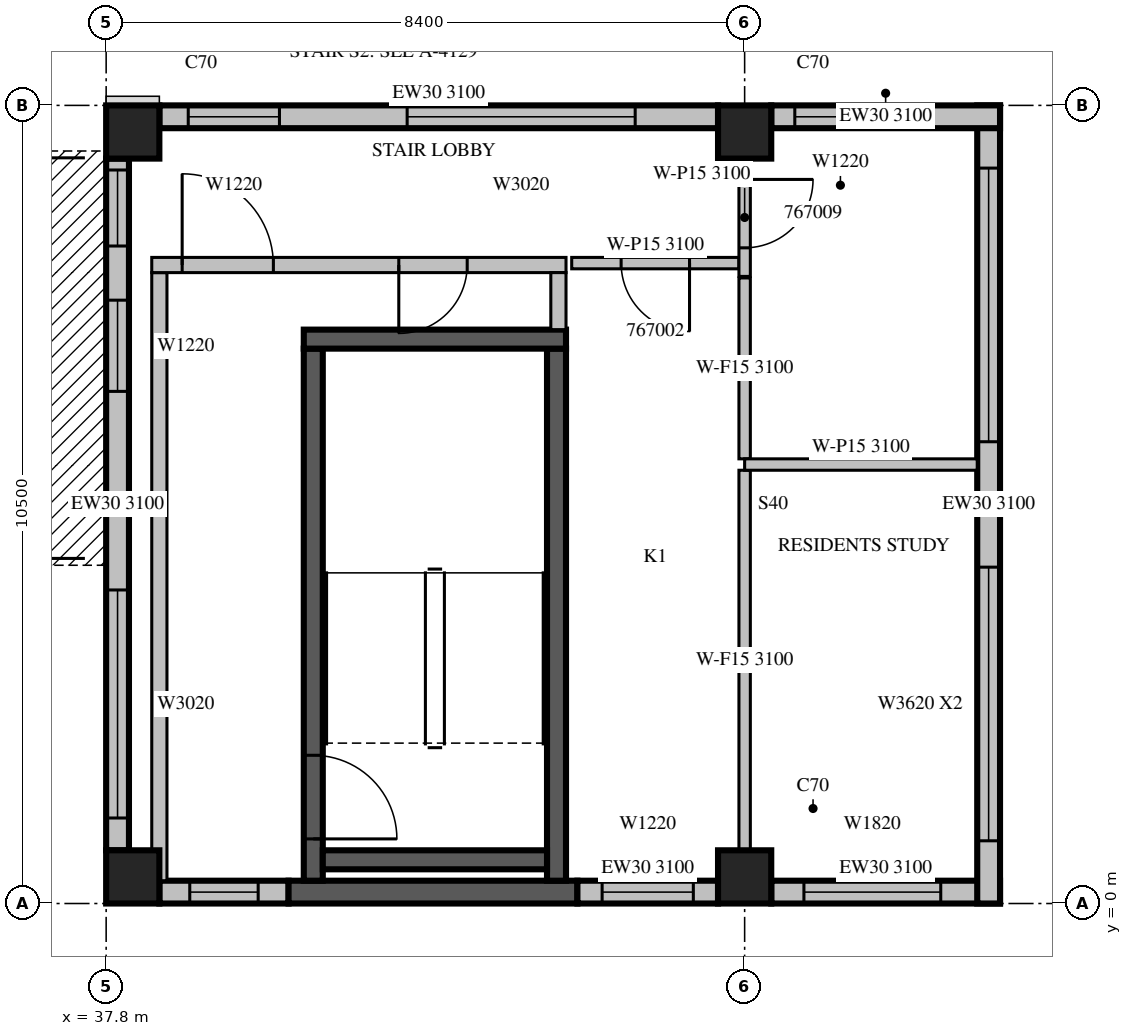
"""IFC4 building model, lengths in metres.
Left out: names, types, materials, properties, quantities, classifications, styles, units other than length and angle.
Written with IfcOpenShell. Run it as: python <this file> out.ifc"""

import sys

from ifc_helpers import new_model, si_unit, direction, frame, frame_2d, origin, origin_2d, place, context, subcontext, project, spatial, rectangle, extrude, source, transform, mapped, element, fill, save


model = new_model("IFC4")
c1 = context("Model", 3, precision=1e-05, world=origin(), true_north=direction((0.0, 1.0)))
c2 = subcontext(c1, "Body", "Model", "MODEL_VIEW")
j1 = project(units=[si_unit("LENGTHUNIT", "METRE"), si_unit("PLANEANGLEUNIT", "RADIAN")], contexts=[c1])
p1 = place(None, origin())
s1 = spatial("IfcSite", under=j1, at=p1, CompositionType="ELEMENT")
p2 = place(p1, origin())
s2 = spatial("IfcBuilding", under=s1, at=p2, CompositionType="ELEMENT")
p3 = place(p2, frame((0.0, 0.0, 295.0)))
s3 = spatial("IfcBuildingStorey", under=s2, at=p3, CompositionType="ELEMENT", Elevation=295.0)
m1 = source(origin(), c2, "Body", "SweptSolid", [
    extrude(rectangle(XDim=0.7, YDim=0.7, at=origin_2d()), origin(), (0.0, 0.0, 1.0), 3.5),
])
for number, where, z_axis, x_axis in (
    (1, (38.15, 0.35, 0.0), (0.0, 0.0, 1.0), (1.0, 0.0, 0.0)),
    (2, (46.2, 0.35, 0.0), (0.0, 0.0, 1.0), (1.0, 0.0, 0.0)),
    (3, (38.15, 10.15, 0.0), (0.0, 0.0, 1.0), (1.0, 0.0, 0.0)),
    (4, (46.2, 10.15, 0.0), (0.0, 0.0, 1.0), (1.0, 0.0, 0.0)),
):
    element("IfcColumn", number, at=place(p3, frame(where, z_axis=z_axis, x_axis=x_axis)), inside=s3, PredefinedType="COLUMN", context=c2, shape_type="MappedRepresentation", body=[
        mapped(m1, transform((0.0, 0.0, 0.0), scale=1.0)),
    ])
m2 = source(origin(), c2, "Body", "SweptSolid", [
    extrude(rectangle(XDim=1.7, YDim=0.3, at=frame_2d((0.85, 0.0))), origin(), (0.0, 0.0, 1.0), 3.1),
])
p4 = place(p3, frame((38.5, 0.15, 0.0), z_axis=(0.0, 0.0, 1.0), x_axis=(1.0, 0.0, 0.0)))
e5 = element("IfcWall", 5, at=p4, inside=s3, PredefinedType="STANDARD", context=c2, shape_type="MappedRepresentation", body=[
    mapped(m2, transform((0.0, 0.0, 0.0), scale=1.0)),
])
m3 = source(origin(), c2, "Body", "SweptSolid", [
    extrude(rectangle(XDim=0.9, YDim=2.0, at=frame_2d((0.45, 1.0))), frame((0.0, 0.16, 0.0), z_axis=(0.0, -1.0, 0.0), x_axis=(1.0, 0.0, 0.0)), (0.0, 0.0, 1.0), 0.32),
])
p5 = place(p4, frame((0.4, 0.0, 0.6)))
e6 = element("IfcOpeningElement", 6, at=p5, cuts=e5, PredefinedType="OPENING", context=c2, shape_type="MappedRepresentation", body=[
    mapped(m3, transform((0.0, 0.0, 0.0), scale=1.0)),
])
m4 = source(origin(), c2, "Body", "SweptSolid", [
    extrude(rectangle(XDim=3.8, YDim=0.3, at=frame_2d((1.9, 0.0))), origin(), (0.0, 0.0, 1.0), 3.1),
])
p6 = place(p3, frame((40.2, 0.15, 0.0), z_axis=(0.0, 0.0, 1.0), x_axis=(1.0, 0.0, 0.0)))
e7 = element("IfcWall", 7, at=p6, inside=s3, PredefinedType="SOLIDWALL", context=c2, shape_type="MappedRepresentation", body=[
    mapped(m4, transform((0.0, 0.0, 0.0), scale=1.0)),
])
m5 = source(origin(), c2, "Body", "SweptSolid", [
    extrude(rectangle(XDim=1.85, YDim=0.3, at=frame_2d((0.925, 0.0))), origin(), (0.0, 0.0, 1.0), 3.1),
])
p7 = place(p3, frame((44.0, 0.15, 0.0), z_axis=(0.0, 0.0, 1.0), x_axis=(1.0, 0.0, 0.0)))
e8 = element("IfcWall", 8, at=p7, inside=s3, PredefinedType="STANDARD", context=c2, shape_type="MappedRepresentation", body=[
    mapped(m5, transform((0.0, 0.0, 0.0), scale=1.0)),
])
m6 = source(origin(), c2, "Body", "SweptSolid", [
    extrude(rectangle(XDim=1.2, YDim=2.0, at=frame_2d((0.6, 1.0))), frame((0.0, 0.16, 0.0), z_axis=(0.0, -1.0, 0.0), x_axis=(1.0, 0.0, 0.0)), (0.0, 0.0, 1.0), 0.32),
])
p8 = place(p7, frame((0.325, 0.0, 0.6)))
e9 = element("IfcOpeningElement", 9, at=p8, cuts=e8, PredefinedType="OPENING", context=c2, shape_type="MappedRepresentation", body=[
    mapped(m6, transform((0.0, 0.0, 0.0), scale=1.0)),
])
m7 = source(origin(), c2, "Body", "SweptSolid", [
    extrude(rectangle(XDim=3.01, YDim=0.3, at=frame_2d((1.505, 0.0))), origin(), (0.0, 0.0, 1.0), 3.1),
])
p9 = place(p3, frame((46.55, 0.15, 0.0), z_axis=(0.0, 0.0, 1.0), x_axis=(1.0, 0.0, 0.0)))
e10 = element("IfcWall", 10, at=p9, inside=s3, PredefinedType="STANDARD", context=c2, shape_type="MappedRepresentation", body=[
    mapped(m7, transform((0.0, 0.0, 0.0), scale=1.0)),
])
m8 = source(origin(), c2, "Body", "SweptSolid", [
    extrude(rectangle(XDim=1.8, YDim=2.0, at=frame_2d((0.9, 1.0))), frame((0.0, 0.16, 0.0), z_axis=(0.0, -1.0, 0.0), x_axis=(1.0, 0.0, 0.0)), (0.0, 0.0, 1.0), 0.32),
])
p10 = place(p9, frame((0.43, 0.0, 0.6)))
e11 = element("IfcOpeningElement", 11, at=p10, cuts=e10, PredefinedType="OPENING", context=c2, shape_type="MappedRepresentation", body=[
    mapped(m8, transform((0.0, 0.0, 0.0), scale=1.0)),
])
m9 = source(origin(), c2, "Body", "SweptSolid", [
    extrude(rectangle(XDim=10.5, YDim=0.3, at=frame_2d((5.25, 0.0))), origin(), (0.0, 0.0, 1.0), 3.1),
])
p11 = place(p3, frame((49.41, 0.0, 0.0), z_axis=(0.0, 0.0, 1.0), x_axis=(0.0, 1.0, 0.0)))
e12 = element("IfcWall", 12, at=p11, inside=s3, PredefinedType="STANDARD", context=c2, shape_type="MappedRepresentation", body=[
    mapped(m9, transform((0.0, 0.0, 0.0), scale=1.0)),
])
m10 = source(origin(), c2, "Body", "SweptSolid", [
    extrude(rectangle(XDim=3.6, YDim=2.0, at=frame_2d((1.8, 1.0))), frame((0.0, 0.16, 0.0), z_axis=(0.0, -1.0, 0.0), x_axis=(1.0, 0.0, 0.0)), (0.0, 0.0, 1.0), 0.32),
])
p12 = place(p11, frame((0.825, 0.0, 0.6)))
e13 = element("IfcOpeningElement", 13, at=p12, cuts=e12, PredefinedType="OPENING", context=c2, shape_type="MappedRepresentation", body=[
    mapped(m10, transform((0.0, 0.0, 0.0), scale=1.0)),
])
p13 = place(p11, frame((6.075, 0.0, 0.6)))
e14 = element("IfcOpeningElement", 14, at=p13, cuts=e12, PredefinedType="OPENING", context=c2, shape_type="MappedRepresentation", body=[
    mapped(m10, transform((0.0, 0.0, 0.0), scale=1.0)),
])
p14 = place(p3, frame((49.56, 10.35, 0.0), z_axis=(0.0, 0.0, 1.0), x_axis=(-1.0, 0.0, 0.0)))
e15 = element("IfcWall", 15, at=p14, inside=s3, PredefinedType="STANDARD", context=c2, shape_type="MappedRepresentation", body=[
    mapped(m7, transform((0.0, 0.0, 0.0), scale=1.0)),
])
p15 = place(p14, frame((1.5, 0.0, 0.6)))
e16 = element("IfcOpeningElement", 16, at=p15, cuts=e15, PredefinedType="OPENING", context=c2, shape_type="MappedRepresentation", body=[
    mapped(m6, transform((0.0, 0.0, 0.0), scale=1.0)),
])
m11 = source(origin(), c2, "Body", "SweptSolid", [
    extrude(rectangle(XDim=7.35, YDim=0.3, at=frame_2d((3.675, 0.0))), origin(), (0.0, 0.0, 1.0), 3.1),
])
p16 = place(p3, frame((45.85, 10.35, 0.0), z_axis=(0.0, 0.0, 1.0), x_axis=(-1.0, 0.0, 0.0)))
e17 = element("IfcWall", 17, at=p16, inside=s3, PredefinedType="STANDARD", context=c2, shape_type="MappedRepresentation", body=[
    mapped(m11, transform((0.0, 0.0, 0.0), scale=1.0)),
])
m12 = source(origin(), c2, "Body", "SweptSolid", [
    extrude(rectangle(XDim=3.0, YDim=2.0, at=frame_2d((1.5, 1.0))), frame((0.0, 0.16, 0.0), z_axis=(0.0, -1.0, 0.0), x_axis=(1.0, 0.0, 0.0)), (0.0, 0.0, 1.0), 0.32),
])
p17 = place(p16, frame((1.09, 0.0, 0.6)))
e18 = element("IfcOpeningElement", 18, at=p17, cuts=e17, PredefinedType="OPENING", context=c2, shape_type="MappedRepresentation", body=[
    mapped(m12, transform((0.0, 0.0, 0.0), scale=1.0)),
])
p18 = place(p16, frame((5.77, 0.0, 0.6)))
e19 = element("IfcOpeningElement", 19, at=p18, cuts=e17, PredefinedType="OPENING", context=c2, shape_type="MappedRepresentation", body=[
    mapped(m6, transform((0.0, 0.0, 0.0), scale=1.0)),
])
p19 = place(p3, frame((37.95, 9.8, 0.0), z_axis=(0.0, 0.0, 1.0), x_axis=(0.0, -1.0, 0.0)))
e20 = element("IfcWall", 20, at=p19, inside=s3, PredefinedType="STANDARD", context=c2, shape_type="SweptSolid", body=[
    extrude(rectangle(XDim=9.1, YDim=0.3, at=frame_2d((4.55, 0.0))), origin(), (0.0, 0.0, 1.0), 3.1),
])
p20 = place(p19, frame((1.863, 0.0, 0.6)))
e21 = element("IfcOpeningElement", 21, at=p20, cuts=e20, PredefinedType="OPENING", context=c2, shape_type="MappedRepresentation", body=[
    mapped(m6, transform((0.0, 0.0, 0.0), scale=1.0)),
])
p21 = place(p19, frame((5.675, 0.0, 0.6)))
e22 = element("IfcOpeningElement", 22, at=p21, cuts=e20, PredefinedType="OPENING", context=c2, shape_type="MappedRepresentation", body=[
    mapped(m12, transform((0.0, 0.0, 0.0), scale=1.0)),
])
p22 = place(p19, frame((0.15, 0.0, 0.0)))
e23 = element("IfcOpeningElement", 23, at=p22, cuts=e20, PredefinedType="OPENING", context=c2, shape_type="SweptSolid", body=[
    extrude(rectangle(XDim=1.0, YDim=2.1, at=frame_2d((0.5, 1.05))), frame((0.0, 0.16, 0.0), z_axis=(0.0, -1.0, 0.0), x_axis=(1.0, 0.0, 0.0)), (0.0, 0.0, 1.0), 0.32),
])
m13 = source(origin(), c2, "Body", "SweptSolid", [
    extrude(rectangle(XDim=7.0, YDim=0.25, at=frame_2d((3.5, 0.0))), origin(), (0.0, 0.0, 1.0), 3.1),
])
p23 = place(p3, frame((40.525, 0.3, 0.0), z_axis=(0.0, 0.0, 1.0), x_axis=(0.0, 1.0, 0.0)))
e24 = element("IfcWall", 24, at=p23, inside=s3, PredefinedType="SOLIDWALL", context=c2, shape_type="MappedRepresentation", body=[
    mapped(m13, transform((0.0, 0.0, 0.0), scale=1.0)),
])
m14 = source(origin(), c2, "Body", "SweptSolid", [
    extrude(rectangle(XDim=1.1, YDim=2.1, at=frame_2d((0.55, 1.05))), frame((0.0, 0.135, 0.0), z_axis=(0.0, -1.0, 0.0), x_axis=(1.0, 0.0, 0.0)), (0.0, 0.0, 1.0), 0.27),
])
p24 = place(p23, frame((0.55, 0.0, 0.0)))
e25 = element("IfcOpeningElement", 25, at=p24, cuts=e24, PredefinedType="OPENING", context=c2, shape_type="MappedRepresentation", body=[
    mapped(m14, transform((0.0, 0.0, 0.0), scale=1.0)),
])
p25 = place(p3, frame((43.725, 0.3, 0.0), z_axis=(0.0, 0.0, 1.0), x_axis=(0.0, 1.0, 0.0)))
e26 = element("IfcWall", 26, at=p25, inside=s3, PredefinedType="SOLIDWALL", context=c2, shape_type="MappedRepresentation", body=[
    mapped(m13, transform((0.0, 0.0, 0.0), scale=1.0)),
])
m15 = source(origin(), c2, "Body", "SweptSolid", [
    extrude(rectangle(XDim=3.45, YDim=0.25, at=frame_2d((1.725, 0.0))), origin(), (0.0, 0.0, 1.0), 3.1),
])
p26 = place(p3, frame((40.4, 7.425, 0.0), z_axis=(0.0, 0.0, 1.0), x_axis=(1.0, 0.0, 0.0)))
e27 = element("IfcWall", 27, at=p26, inside=s3, PredefinedType="SOLIDWALL", context=c2, shape_type="MappedRepresentation", body=[
    mapped(m15, transform((0.0, 0.0, 0.0), scale=1.0)),
])
m16 = source(origin(), c2, "Body", "SweptSolid", [
    extrude(rectangle(XDim=2.95, YDim=0.25, at=frame_2d((1.475, 0.0))), origin(), (0.0, 0.0, 1.0), 3.1),
])
p27 = place(p3, frame((40.65, 0.575, 0.0), z_axis=(0.0, 0.0, 1.0), x_axis=(1.0, 0.0, 0.0)))
e28 = element("IfcWall", 28, at=p27, inside=s3, PredefinedType="SOLIDWALL", context=c2, shape_type="MappedRepresentation", body=[
    mapped(m16, transform((0.0, 0.0, 0.0), scale=1.0)),
])
m17 = source(origin(), c2, "Body", "SweptSolid", [
    extrude(rectangle(XDim=8.0, YDim=0.2, at=frame_2d((4.0, 0.0))), origin(), (0.0, 0.0, 1.0), 3.1),
])
p28 = place(p3, frame((38.5, 0.3, 0.0), z_axis=(0.0, 0.0, 1.0), x_axis=(0.0, 1.0, 0.0)))
e29 = element("IfcWall", 29, at=p28, inside=s3, PredefinedType="PARTITIONING", context=c2, shape_type="MappedRepresentation", body=[
    mapped(m17, transform((0.0, 0.0, 0.0), scale=1.0)),
])
m18 = source(origin(), c2, "Body", "SweptSolid", [
    extrude(rectangle(XDim=5.45, YDim=0.2, at=frame_2d((2.725, 0.0))), origin(), (0.0, 0.0, 1.0), 3.1),
])
p29 = place(p3, frame((38.4, 8.4, 0.0), z_axis=(0.0, 0.0, 1.0), x_axis=(1.0, 0.0, 0.0)))
e30 = element("IfcWall", 30, at=p29, inside=s3, PredefinedType="PARTITIONING", context=c2, shape_type="MappedRepresentation", body=[
    mapped(m18, transform((0.0, 0.0, 0.0), scale=1.0)),
])
m19 = source(origin(), c2, "Body", "SweptSolid", [
    extrude(rectangle(XDim=1.2, YDim=2.1, at=frame_2d((0.6, 1.05))), frame((0.0, 0.11, 0.0), z_axis=(0.0, -1.0, 0.0), x_axis=(1.0, 0.0, 0.0)), (0.0, 0.0, 1.0), 0.22),
])
p30 = place(p29, frame((0.4, 0.0, 0.0)))
e31 = element("IfcOpeningElement", 31, at=p30, cuts=e30, PredefinedType="OPENING", context=c2, shape_type="MappedRepresentation", body=[
    mapped(m19, transform((0.0, 0.0, 0.0), scale=1.0)),
])
m20 = source(origin(), c2, "Body", "SweptSolid", [
    extrude(rectangle(XDim=0.9, YDim=2.1, at=frame_2d((0.45, 1.05))), frame((0.0, 0.11, 0.0), z_axis=(0.0, -1.0, 0.0), x_axis=(1.0, 0.0, 0.0)), (0.0, 0.0, 1.0), 0.22),
])
p31 = place(p29, frame((3.25, 0.0, 0.0)))
e32 = element("IfcOpeningElement", 32, at=p31, cuts=e30, PredefinedType="OPENING", context=c2, shape_type="MappedRepresentation", body=[
    mapped(m20, transform((0.0, 0.0, 0.0), scale=1.0)),
])
m21 = source(origin(), c2, "Body", "SweptSolid", [
    extrude(rectangle(XDim=0.75, YDim=0.2, at=frame_2d((0.375, 0.0))), origin(), (0.0, 0.0, 1.0), 3.1),
])
p32 = place(p3, frame((43.75, 7.55, 0.0), z_axis=(0.0, 0.0, 1.0), x_axis=(0.0, 1.0, 0.0)))
e33 = element("IfcWall", 33, at=p32, inside=s3, PredefinedType="PARTITIONING", context=c2, shape_type="MappedRepresentation", body=[
    mapped(m21, transform((0.0, 0.0, 0.0), scale=1.0)),
])
m22 = source(origin(), c2, "Body", "SweptSolid", [
    extrude(rectangle(XDim=2.2, YDim=0.15, at=frame_2d((1.1, 0.0))), origin(), (0.0, 0.0, 1.0), 3.1),
])
p33 = place(p3, frame((46.125, 8.425, 0.0), z_axis=(0.0, 0.0, 1.0), x_axis=(-1.0, 0.0, 0.0)))
e34 = element("IfcWall", 34, at=p33, inside=s3, PredefinedType="PARTITIONING", context=c2, shape_type="MappedRepresentation", body=[
    mapped(m22, transform((0.0, 0.0, 0.0), scale=1.0)),
])
m23 = source(origin(), c2, "Body", "SweptSolid", [
    extrude(rectangle(XDim=0.9, YDim=2.1, at=frame_2d((0.45, 1.05))), frame((0.0, 0.085, 0.0), z_axis=(0.0, -1.0, 0.0), x_axis=(1.0, 0.0, 0.0)), (0.0, 0.0, 1.0), 0.17),
])
p34 = place(p33, frame((0.65, 0.0, 0.0)))
e35 = element("IfcOpeningElement", 35, at=p34, cuts=e34, PredefinedType="OPENING", context=c2, shape_type="MappedRepresentation", body=[
    mapped(m23, transform((0.0, 0.0, 0.0), scale=1.0)),
])
p35 = place(p3, frame((46.2, 9.801, 0.0), z_axis=(0.0, 0.0, 1.0), x_axis=(0.0, -1.0, 0.0)))
e36 = element("IfcWall", 36, at=p35, inside=s3, PredefinedType="PARTITIONING", context=c2, shape_type="SweptSolid", body=[
    extrude(rectangle(XDim=1.551, YDim=0.15, at=frame_2d((0.775, 0.0))), origin(), (0.0, 0.0, 1.0), 3.1),
])
p36 = place(p35, frame((0.275, 0.0, 0.0)))
e37 = element("IfcOpeningElement", 37, at=p36, cuts=e36, PredefinedType="OPENING", context=c2, shape_type="MappedRepresentation", body=[
    mapped(m23, transform((0.0, 0.0, 0.0), scale=1.0)),
])
p37 = place(p3, frame((46.2, 0.699, 0.0), z_axis=(0.0, 0.0, 1.0), x_axis=(0.0, 1.0, 0.0)))
e38 = element("IfcWall", 38, at=p37, inside=s3, PredefinedType="PARTITIONING", context=c2, shape_type="SweptSolid", body=[
    extrude(rectangle(XDim=5.001, YDim=0.15, at=frame_2d((2.501, 0.0))), origin(), (0.0, 0.0, 1.0), 3.1),
])
p38 = place(p3, frame((46.2, 5.85, 0.0), z_axis=(0.0, 0.0, 1.0), x_axis=(0.0, 1.0, 0.0)))
e39 = element("IfcWall", 39, at=p38, inside=s3, PredefinedType="PARTITIONING", context=c2, shape_type="SweptSolid", body=[
    extrude(rectangle(XDim=2.38, YDim=0.15, at=frame_2d((1.19, 0.0))), origin(), (0.0, 0.0, 1.0), 3.1),
])
m24 = source(origin(), c2, "Body", "SweptSolid", [
    extrude(rectangle(XDim=3.06, YDim=0.15, at=frame_2d((1.53, 0.0))), origin(), (0.0, 0.0, 1.0), 3.1),
])
p39 = place(p3, frame((49.26, 5.775, 0.0), z_axis=(0.0, 0.0, 1.0), x_axis=(-1.0, 0.0, 0.0)))
e40 = element("IfcWall", 40, at=p39, inside=s3, PredefinedType="PARTITIONING", context=c2, shape_type="MappedRepresentation", body=[
    mapped(m24, transform((0.0, 0.0, 0.0), scale=1.0)),
])
m25 = source(origin(), c2, "Body", "SweptSolid", [
    extrude(rectangle(XDim=0.9, YDim=2.0, at=frame_2d((0.45, 1.0))), frame((0.0, 0.03, 0.0), z_axis=(0.0, -1.0, 0.0), x_axis=(1.0, 0.0, 0.0)), (0.0, 0.0, 1.0), 0.06),
])
p40 = place(p5, origin())
e41 = element("IfcWindow", 41, at=p40, inside=s3, PartitioningType="SINGLE_PANEL", PredefinedType="WINDOW", context=c2, shape_type="MappedRepresentation", body=[
    mapped(m25, transform((0.0, 0.0, 0.0), scale=1.0)),
])
fill(e6, e41)
m26 = source(origin(), c2, "Body", "SweptSolid", [
    extrude(rectangle(XDim=1.2, YDim=2.0, at=frame_2d((0.6, 1.0))), frame((0.0, 0.03, 0.0), z_axis=(0.0, -1.0, 0.0), x_axis=(1.0, 0.0, 0.0)), (0.0, 0.0, 1.0), 0.06),
])
p41 = place(p8, origin())
e42 = element("IfcWindow", 42, at=p41, inside=s3, PartitioningType="SINGLE_PANEL", PredefinedType="WINDOW", context=c2, shape_type="MappedRepresentation", body=[
    mapped(m26, transform((0.0, 0.0, 0.0), scale=1.0)),
])
fill(e9, e42)
m27 = source(origin(), c2, "Body", "SweptSolid", [
    extrude(rectangle(XDim=1.8, YDim=2.0, at=frame_2d((0.9, 1.0))), frame((0.0, 0.03, 0.0), z_axis=(0.0, -1.0, 0.0), x_axis=(1.0, 0.0, 0.0)), (0.0, 0.0, 1.0), 0.06),
])
p42 = place(p10, origin())
e43 = element("IfcWindow", 43, at=p42, inside=s3, PartitioningType="SINGLE_PANEL", PredefinedType="WINDOW", context=c2, shape_type="MappedRepresentation", body=[
    mapped(m27, transform((0.0, 0.0, 0.0), scale=1.0)),
])
fill(e11, e43)
m28 = source(origin(), c2, "Body", "SweptSolid", [
    extrude(rectangle(XDim=3.6, YDim=2.0, at=frame_2d((1.8, 1.0))), frame((0.0, 0.03, 0.0), z_axis=(0.0, -1.0, 0.0), x_axis=(1.0, 0.0, 0.0)), (0.0, 0.0, 1.0), 0.06),
])
p43 = place(p12, origin())
e44 = element("IfcWindow", 44, at=p43, inside=s3, PartitioningType="SINGLE_PANEL", PredefinedType="WINDOW", context=c2, shape_type="MappedRepresentation", body=[
    mapped(m28, transform((0.0, 0.0, 0.0), scale=1.0)),
])
fill(e13, e44)
p44 = place(p13, origin())
e45 = element("IfcWindow", 45, at=p44, inside=s3, PartitioningType="SINGLE_PANEL", PredefinedType="WINDOW", context=c2, shape_type="MappedRepresentation", body=[
    mapped(m28, transform((0.0, 0.0, 0.0), scale=1.0)),
])
fill(e14, e45)
p45 = place(p15, origin())
e46 = element("IfcWindow", 46, at=p45, inside=s3, PartitioningType="SINGLE_PANEL", PredefinedType="WINDOW", context=c2, shape_type="MappedRepresentation", body=[
    mapped(m26, transform((0.0, 0.0, 0.0), scale=1.0)),
])
fill(e16, e46)
m29 = source(origin(), c2, "Body", "SweptSolid", [
    extrude(rectangle(XDim=3.0, YDim=2.0, at=frame_2d((1.5, 1.0))), frame((0.0, 0.03, 0.0), z_axis=(0.0, -1.0, 0.0), x_axis=(1.0, 0.0, 0.0)), (0.0, 0.0, 1.0), 0.06),
])
p46 = place(p17, origin())
e47 = element("IfcWindow", 47, at=p46, inside=s3, PartitioningType="SINGLE_PANEL", PredefinedType="WINDOW", context=c2, shape_type="MappedRepresentation", body=[
    mapped(m29, transform((0.0, 0.0, 0.0), scale=1.0)),
])
fill(e18, e47)
p47 = place(p18, origin())
e48 = element("IfcWindow", 48, at=p47, inside=s3, PartitioningType="SINGLE_PANEL", PredefinedType="WINDOW", context=c2, shape_type="MappedRepresentation", body=[
    mapped(m26, transform((0.0, 0.0, 0.0), scale=1.0)),
])
fill(e19, e48)
p48 = place(p20, origin())
e49 = element("IfcWindow", 49, at=p48, inside=s3, PartitioningType="SINGLE_PANEL", PredefinedType="WINDOW", context=c2, shape_type="MappedRepresentation", body=[
    mapped(m26, transform((0.0, 0.0, 0.0), scale=1.0)),
])
fill(e21, e49)
p49 = place(p21, origin())
e50 = element("IfcWindow", 50, at=p49, inside=s3, PartitioningType="SINGLE_PANEL", PredefinedType="WINDOW", context=c2, shape_type="MappedRepresentation", body=[
    mapped(m29, transform((0.0, 0.0, 0.0), scale=1.0)),
])
fill(e22, e50)
p50 = place(p22, origin())
e51 = element("IfcDoor", 51, at=p50, inside=s3, OperationType="SLIDING_TO_LEFT", PredefinedType="DOOR", context=c2, shape_type="SweptSolid", body=[
    extrude(rectangle(XDim=1.0, YDim=2.1, at=frame_2d((0.5, 1.05))), frame((0.0, 0.025, 0.0), z_axis=(0.0, -1.0, 0.0), x_axis=(1.0, 0.0, 0.0)), (0.0, 0.0, 1.0), 0.05),
])
fill(e23, e51)
m30 = source(origin(), c2, "Body", "SweptSolid", [
    extrude(rectangle(XDim=1.1, YDim=2.1, at=frame_2d((0.55, 1.05))), frame((0.0, 0.025, 0.0), z_axis=(0.0, -1.0, 0.0), x_axis=(1.0, 0.0, 0.0)), (0.0, 0.0, 1.0), 0.05),
])
p51 = place(p24, origin())
e52 = element("IfcDoor", 52, at=p51, inside=s3, OperationType="SINGLE_SWING_RIGHT", PredefinedType="DOOR", context=c2, shape_type="MappedRepresentation", body=[
    mapped(m30, transform((0.0, 0.0, 0.0), scale=1.0)),
])
fill(e25, e52)
m31 = source(origin(), c2, "Body", "SweptSolid", [
    extrude(rectangle(XDim=1.2, YDim=2.1, at=frame_2d((0.6, 1.05))), frame((0.0, 0.025, 0.0), z_axis=(0.0, -1.0, 0.0), x_axis=(1.0, 0.0, 0.0)), (0.0, 0.0, 1.0), 0.05),
])
p52 = place(p30, origin())
e53 = element("IfcDoor", 53, at=p52, inside=s3, OperationType="SINGLE_SWING_LEFT", PredefinedType="DOOR", context=c2, shape_type="MappedRepresentation", body=[
    mapped(m31, transform((0.0, 0.0, 0.0), scale=1.0)),
])
fill(e31, e53)
m32 = source(origin(), c2, "Body", "SweptSolid", [
    extrude(rectangle(XDim=0.9, YDim=2.1, at=frame_2d((0.45, 1.05))), frame((0.0, 0.025, 0.0), z_axis=(0.0, -1.0, 0.0), x_axis=(1.0, 0.0, 0.0)), (0.0, 0.0, 1.0), 0.05),
])
p53 = place(p31, origin())
e54 = element("IfcDoor", 54, at=p53, inside=s3, OperationType="SINGLE_SWING_RIGHT", PredefinedType="DOOR", context=c2, shape_type="MappedRepresentation", body=[
    mapped(m32, transform((0.0, 0.0, 0.0), scale=1.0)),
])
fill(e32, e54)
p54 = place(p34, origin())
e55 = element("IfcDoor", 55, at=p54, inside=s3, OperationType="SINGLE_SWING_LEFT", PredefinedType="DOOR", context=c2, shape_type="MappedRepresentation", body=[
    mapped(m32, transform((0.0, 0.0, 0.0), scale=1.0)),
])
fill(e35, e55)
p55 = place(p36, origin())
e56 = element("IfcDoor", 56, at=p55, inside=s3, OperationType="SINGLE_SWING_LEFT", PredefinedType="DOOR", context=c2, shape_type="MappedRepresentation", body=[
    mapped(m32, transform((0.0, 0.0, 0.0), scale=1.0)),
])
fill(e37, e56)
save(model, sys.argv[1])
